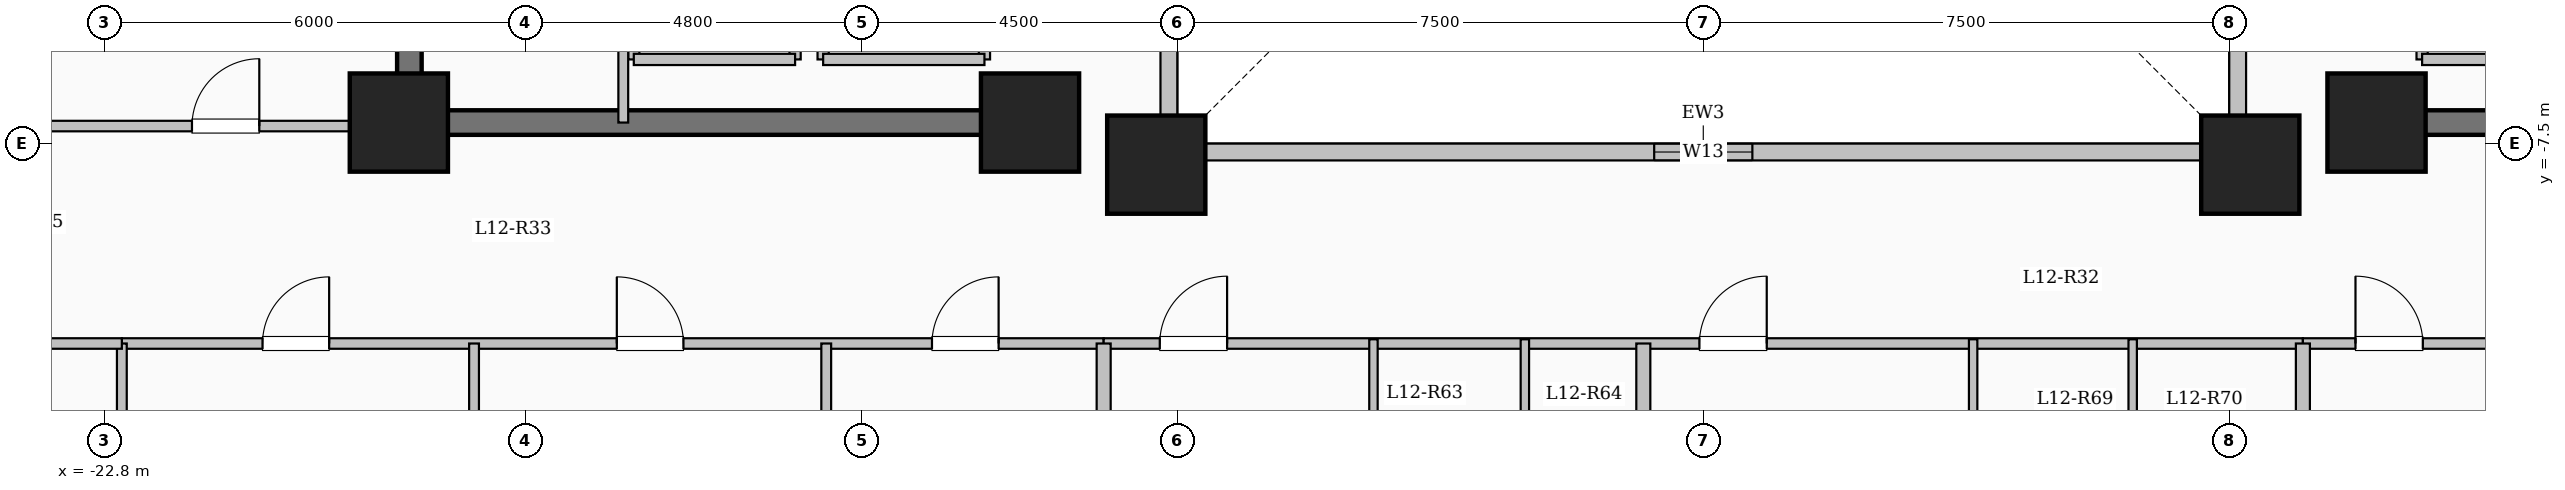
"""IFC4 building model, lengths in metres.
Left out: names, types, materials, properties, quantities, classifications, styles, units other than length and angle.
Written with IfcOpenShell. Run it as: python <this file> out.ifc"""

import sys

from ifc_helpers import new_model, si_unit, direction, frame, frame_2d, origin, origin_2d, place, context, subcontext, project, spatial, rectangle, extrude, element, fill, save


model = new_model("IFC4")
c1 = context("Model", 3, precision=1e-05, world=origin(), true_north=direction((0.0, 1.0)))
c2 = subcontext(c1, "Body", "Model", "MODEL_VIEW")
j1 = project(units=[si_unit("LENGTHUNIT", "METRE"), si_unit("PLANEANGLEUNIT", "RADIAN")], contexts=[c1])
p1 = place(None, origin())
s1 = spatial("IfcSite", under=j1, at=p1, CompositionType="ELEMENT")
p2 = place(p1, origin())
s2 = spatial("IfcBuilding", under=s1, at=p2, CompositionType="ELEMENT")
p3 = place(p2, frame((0.0, 0.0, 47.45)))
s3 = spatial("IfcBuildingStorey", under=s2, at=p3, CompositionType="ELEMENT", Elevation=47.45)
for number, where, z_axis, x_axis in (
    (1, (-7.8, -7.8, 0.0), (0.0, 0.0, 1.0), (1.0, 0.0, 0.0)),
    (2, (7.8, -7.8, 0.0), (0.0, 0.0, 1.0), (1.0, 0.0, 0.0)),
    (3, (-9.6, -7.2, 0.0), (0.0, 0.0, 1.0), (1.0, 0.0, 0.0)),
    (4, (9.6, -7.2, 0.0), (0.0, 0.0, 1.0), (1.0, 0.0, 0.0)),
    (5, (-18.6, -7.2, 0.0), (0.0, 0.0, 1.0), (1.0, 0.0, 0.0)),
):
    element("IfcColumn", number, at=place(p3, frame(where, z_axis=z_axis, x_axis=x_axis)), inside=s3, PredefinedType="COLUMN", context=c2, shape_type="SweptSolid", body=[
        extrude(rectangle(XDim=1.4, YDim=1.4, at=origin_2d()), origin(), (0.0, 0.0, 1.0), 3.35),
    ])
p4 = place(p3, frame((-7.62, -7.62, 0.0), z_axis=(0.0, 0.0, 1.0), x_axis=(1.0, 0.0, 0.0)))
e6 = element("IfcWall", 6, at=p4, inside=s3, PredefinedType="SOLIDWALL", context=c2, shape_type="SweptSolid", body=[
    extrude(rectangle(XDim=15.24, YDim=0.24, at=frame_2d((7.62, 0.0))), origin(), (0.0, 0.0, 1.0), 3.1),
])
p5 = place(p4, frame((6.92, 0.0, 0.95)))
e7 = element("IfcOpeningElement", 7, at=p5, cuts=e6, PredefinedType="OPENING", context=c2, shape_type="SweptSolid", body=[
    extrude(rectangle(XDim=1.4, YDim=1.5, at=frame_2d((0.7, 0.75))), frame((0.0, 0.13, 0.0), z_axis=(0.0, -1.0, 0.0), x_axis=(1.0, 0.0, 0.0)), (0.0, 0.0, 1.0), 0.26),
])
p6 = place(p3, frame((7.62, -7.62, 0.0), z_axis=(0.0, 0.0, 1.0), x_axis=(0.0, 1.0, 0.0)))
e8 = element("IfcWall", 8, at=p6, inside=s3, PredefinedType="SOLIDWALL", context=c2, shape_type="SweptSolid", body=[
    extrude(rectangle(XDim=15.24, YDim=0.24, at=frame_2d((7.62, 0.0))), origin(), (0.0, 0.0, 1.0), 3.1),
])
p7 = place(p6, frame((6.92, 0.0, 0.95)))
e9 = element("IfcOpeningElement", 9, at=p7, cuts=e8, PredefinedType="OPENING", context=c2, shape_type="SweptSolid", body=[
    extrude(rectangle(XDim=1.4, YDim=1.5, at=frame_2d((0.7, 0.75))), frame((0.0, 0.13, 0.0), z_axis=(0.0, -1.0, 0.0), x_axis=(1.0, 0.0, 0.0)), (0.0, 0.0, 1.0), 0.26),
])
p8 = place(p3, frame((-7.62, 7.62, 0.0), z_axis=(0.0, 0.0, 1.0), x_axis=(0.0, -1.0, 0.0)))
e10 = element("IfcWall", 10, at=p8, inside=s3, PredefinedType="SOLIDWALL", context=c2, shape_type="SweptSolid", body=[
    extrude(rectangle(XDim=15.24, YDim=0.24, at=frame_2d((7.62, 0.0))), origin(), (0.0, 0.0, 1.0), 3.1),
])
p9 = place(p8, frame((6.92, 0.0, 0.95)))
e11 = element("IfcOpeningElement", 11, at=p9, cuts=e10, PredefinedType="OPENING", context=c2, shape_type="SweptSolid", body=[
    extrude(rectangle(XDim=1.4, YDim=1.5, at=frame_2d((0.7, 0.75))), frame((0.0, 0.13, 0.0), z_axis=(0.0, -1.0, 0.0), x_axis=(1.0, 0.0, 0.0)), (0.0, 0.0, 1.0), 0.26),
])
p10 = place(p3, frame((-12.55, -6.3, 0.0), z_axis=(0.0, 0.0, 1.0), x_axis=(0.0, 1.0, 0.0)))
e12 = element("IfcWall", 12, at=p10, inside=s3, PredefinedType="SOLIDWALL", context=c2, shape_type="SweptSolid", body=[
    extrude(rectangle(XDim=2.6, YDim=0.16, at=frame_2d((1.3, 0.0))), origin(), (0.0, 0.0, 1.0), 3.1),
])
p11 = place(p3, frame((-10.25, -6.3, 0.0), z_axis=(0.0, 0.0, 1.0), x_axis=(0.0, 1.0, 0.0)))
e13 = element("IfcWall", 13, at=p11, inside=s3, PredefinedType="SOLIDWALL", context=c2, shape_type="SweptSolid", body=[
    extrude(rectangle(XDim=2.6, YDim=0.16, at=frame_2d((1.3, 0.0))), origin(), (0.0, 0.0, 1.0), 3.1),
])
p12 = place(p11, frame((0.75, 0.0, 0.0)))
e14 = element("IfcOpeningElement", 14, at=p12, cuts=e13, PredefinedType="OPENING", context=c2, shape_type="SweptSolid", body=[
    extrude(rectangle(XDim=1.1, YDim=2.15, at=frame_2d((0.55, 1.075))), frame((0.0, 0.09, 0.0), z_axis=(0.0, -1.0, 0.0), x_axis=(1.0, 0.0, 0.0)), (0.0, 0.0, 1.0), 0.18),
])
p13 = place(p3, frame((-12.55, -6.3, 0.0), z_axis=(0.0, 0.0, 1.0), x_axis=(1.0, 0.0, 0.0)))
e15 = element("IfcWall", 15, at=p13, inside=s3, PredefinedType="SOLIDWALL", context=c2, shape_type="SweptSolid", body=[
    extrude(rectangle(XDim=2.3, YDim=0.16, at=frame_2d((1.15, 0.0))), origin(), (0.0, 0.0, 1.0), 3.1),
])
for number, where, z_axis, x_axis in (
    (16, (-15.25, -6.3, 0.0), (0.0, 0.0, 1.0), (0.0, 1.0, 0.0)),
    (17, (-12.95, -6.3, 0.0), (0.0, 0.0, 1.0), (0.0, 1.0, 0.0)),
):
    element("IfcWall", number, at=place(p3, frame(where, z_axis=z_axis, x_axis=x_axis)), inside=s3, PredefinedType="SOLIDWALL", context=c2, shape_type="SweptSolid", body=[
        extrude(rectangle(XDim=2.6, YDim=0.16, at=frame_2d((1.3, 0.0))), origin(), (0.0, 0.0, 1.0), 3.1),
    ])
p14 = place(p3, frame((-15.25, -6.3, 0.0), z_axis=(0.0, 0.0, 1.0), x_axis=(1.0, 0.0, 0.0)))
e18 = element("IfcWall", 18, at=p14, inside=s3, PredefinedType="SOLIDWALL", context=c2, shape_type="SweptSolid", body=[
    extrude(rectangle(XDim=2.3, YDim=0.16, at=frame_2d((1.15, 0.0))), origin(), (0.0, 0.0, 1.0), 3.1),
])
p15 = place(p3, frame((10.25, -6.3, 0.0), z_axis=(0.0, 0.0, 1.0), x_axis=(0.0, 1.0, 0.0)))
e19 = element("IfcWall", 19, at=p15, inside=s3, PredefinedType="SOLIDWALL", context=c2, shape_type="SweptSolid", body=[
    extrude(rectangle(XDim=2.6, YDim=0.16, at=frame_2d((1.3, 0.0))), origin(), (0.0, 0.0, 1.0), 3.1),
])
p16 = place(p3, frame((10.25, -6.3, 0.0), z_axis=(0.0, 0.0, 1.0), x_axis=(1.0, 0.0, 0.0)))
e20 = element("IfcWall", 20, at=p16, inside=s3, PredefinedType="SOLIDWALL", context=c2, shape_type="SweptSolid", body=[
    extrude(rectangle(XDim=2.3, YDim=0.16, at=frame_2d((1.15, 0.0))), origin(), (0.0, 0.0, 1.0), 3.1),
])
p17 = place(p3, frame((-18.45, -7.375, 0.0), z_axis=(0.0, 0.0, 1.0), x_axis=(0.0, 1.0, 0.0)))
e21 = element("IfcWall", 21, at=p17, inside=s3, PredefinedType="SHEAR", context=c2, shape_type="SweptSolid", body=[
    extrude(rectangle(XDim=14.05, YDim=0.35, at=frame_2d((7.025, 0.0))), origin(), (0.0, 0.0, 1.0), 3.35),
])
for number, where, z_axis, x_axis in (
    (22, (-18.625, -7.2, 0.0), (0.0, 0.0, 1.0), (1.0, 0.0, 0.0)),
    (23, (10.075, -7.2, 0.0), (0.0, 0.0, 1.0), (1.0, 0.0, 0.0)),
):
    element("IfcWall", number, at=place(p3, frame(where, z_axis=z_axis, x_axis=x_axis)), inside=s3, PredefinedType="SHEAR", context=c2, shape_type="SweptSolid", body=[
        extrude(rectangle(XDim=8.55, YDim=0.35, at=frame_2d((4.275, 0.0))), origin(), (0.0, 0.0, 1.0), 3.35),
    ])
p18 = place(p3, frame((-15.4, -7.2, 0.0), z_axis=(0.0, 0.0, 1.0), x_axis=(0.0, 1.0, 0.0)))
e24 = element("IfcWall", 24, at=p18, inside=s3, PredefinedType="PARTITIONING", context=c2, shape_type="SweptSolid", body=[
    extrude(rectangle(XDim=10.45, YDim=0.14, at=frame_2d((5.225, 0.0))), origin(), (0.0, 0.0, 1.0), 3.1),
])
p19 = place(p18, frame((9.25, 0.0, 0.0)))
e25 = element("IfcOpeningElement", 25, at=p19, cuts=e24, PredefinedType="OPENING", context=c2, shape_type="SweptSolid", body=[
    extrude(rectangle(XDim=0.9, YDim=2.08, at=frame_2d((0.45, 1.04))), frame((0.0, 0.08, 0.0), z_axis=(0.0, -1.0, 0.0), x_axis=(1.0, 0.0, 0.0)), (0.0, 0.0, 1.0), 0.16),
])
p20 = place(p3, frame((-22.55, -10.35, 0.0), z_axis=(0.0, 0.0, 1.0), x_axis=(1.0, 0.0, 0.0)))
e26 = element("IfcWall", 26, at=p20, inside=s3, PredefinedType="PARTITIONING", context=c2, shape_type="SweptSolid", body=[
    extrude(rectangle(XDim=14.0, YDim=0.15, at=frame_2d((7.0, 0.0))), origin(), (0.0, 0.0, 1.0), 3.1),
])
p21 = place(p20, frame((2.006, 0.0, 0.0)))
e27 = element("IfcOpeningElement", 27, at=p21, cuts=e26, PredefinedType="OPENING", context=c2, shape_type="SweptSolid", body=[
    extrude(rectangle(XDim=0.95, YDim=2.15, at=frame_2d((0.475, 1.075))), frame((0.0, 0.085, 0.0), z_axis=(0.0, -1.0, 0.0), x_axis=(1.0, 0.0, 0.0)), (0.0, 0.0, 1.0), 0.17),
])
p22 = place(p20, frame((7.058, 0.0, 0.0)))
e28 = element("IfcOpeningElement", 28, at=p22, cuts=e26, PredefinedType="OPENING", context=c2, shape_type="SweptSolid", body=[
    extrude(rectangle(XDim=0.95, YDim=2.15, at=frame_2d((0.475, 1.075))), frame((0.0, 0.085, 0.0), z_axis=(0.0, -1.0, 0.0), x_axis=(1.0, 0.0, 0.0)), (0.0, 0.0, 1.0), 0.17),
])
p23 = place(p20, frame((11.552, 0.0, 0.0)))
e29 = element("IfcOpeningElement", 29, at=p23, cuts=e26, PredefinedType="OPENING", context=c2, shape_type="SweptSolid", body=[
    extrude(rectangle(XDim=0.95, YDim=2.15, at=frame_2d((0.475, 1.075))), frame((0.0, 0.085, 0.0), z_axis=(0.0, -1.0, 0.0), x_axis=(1.0, 0.0, 0.0)), (0.0, 0.0, 1.0), 0.17),
])
p24 = place(p3, frame((-8.55, -10.35, 0.0), z_axis=(0.0, 0.0, 1.0), x_axis=(1.0, 0.0, 0.0)))
e30 = element("IfcWall", 30, at=p24, inside=s3, PredefinedType="PARTITIONING", context=c2, shape_type="SweptSolid", body=[
    extrude(rectangle(XDim=17.1, YDim=0.15, at=frame_2d((8.55, 0.0))), origin(), (0.0, 0.0, 1.0), 3.1),
])
p25 = place(p24, frame((0.8, 0.0, 0.0)))
e31 = element("IfcOpeningElement", 31, at=p25, cuts=e30, PredefinedType="OPENING", context=c2, shape_type="SweptSolid", body=[
    extrude(rectangle(XDim=0.96, YDim=2.15, at=frame_2d((0.48, 1.075))), frame((0.0, 0.085, 0.0), z_axis=(0.0, -1.0, 0.0), x_axis=(1.0, 0.0, 0.0)), (0.0, 0.0, 1.0), 0.17),
])
p26 = place(p24, frame((8.495, 0.0, 0.0)))
e32 = element("IfcOpeningElement", 32, at=p26, cuts=e30, PredefinedType="OPENING", context=c2, shape_type="SweptSolid", body=[
    extrude(rectangle(XDim=0.96, YDim=2.15, at=frame_2d((0.48, 1.075))), frame((0.0, 0.085, 0.0), z_axis=(0.0, -1.0, 0.0), x_axis=(1.0, 0.0, 0.0)), (0.0, 0.0, 1.0), 0.17),
])
p27 = place(p3, frame((8.55, -10.35, 0.0), z_axis=(0.0, 0.0, 1.0), x_axis=(1.0, 0.0, 0.0)))
e33 = element("IfcWall", 33, at=p27, inside=s3, PredefinedType="PARTITIONING", context=c2, shape_type="SweptSolid", body=[
    extrude(rectangle(XDim=14.0, YDim=0.15, at=frame_2d((7.0, 0.0))), origin(), (0.0, 0.0, 1.0), 3.1),
])
p28 = place(p27, frame((0.75, 0.0, 0.0)))
e34 = element("IfcOpeningElement", 34, at=p28, cuts=e33, PredefinedType="OPENING", context=c2, shape_type="SweptSolid", body=[
    extrude(rectangle(XDim=0.96, YDim=2.15, at=frame_2d((0.48, 1.075))), frame((0.0, 0.085, 0.0), z_axis=(0.0, -1.0, 0.0), x_axis=(1.0, 0.0, 0.0)), (0.0, 0.0, 1.0), 0.17),
])
p29 = place(p27, frame((7.446, 0.0, 0.0)))
e35 = element("IfcOpeningElement", 35, at=p29, cuts=e33, PredefinedType="OPENING", context=c2, shape_type="SweptSolid", body=[
    extrude(rectangle(XDim=0.96, YDim=2.15, at=frame_2d((0.48, 1.075))), frame((0.0, 0.085, 0.0), z_axis=(0.0, -1.0, 0.0), x_axis=(1.0, 0.0, 0.0)), (0.0, 0.0, 1.0), 0.17),
])
for number, where, z_axis, x_axis in (
    (36, (-17.528, -23.55, 0.0), (0.0, 0.0, 1.0), (0.0, 1.0, 0.0)),
    (37, (-12.506, -23.55, 0.0), (0.0, 0.0, 1.0), (0.0, 1.0, 0.0)),
):
    element("IfcWall", number, at=place(p3, frame(where, z_axis=z_axis, x_axis=x_axis)), inside=s3, PredefinedType="PARTITIONING", context=c2, shape_type="SweptSolid", body=[
        extrude(rectangle(XDim=13.2, YDim=0.14, at=frame_2d((6.6, 0.0))), origin(), (0.0, 0.0, 1.0), 3.1),
    ])
for number, where, z_axis, x_axis in (
    (38, (-8.55, -24.204, 0.0), (0.0, 0.0, 1.0), (0.0, 1.0, 0.0)),
    (39, (8.55, -24.204, 0.0), (0.0, 0.0, 1.0), (0.0, 1.0, 0.0)),
):
    element("IfcWall", number, at=place(p3, frame(where, z_axis=z_axis, x_axis=x_axis)), inside=s3, PredefinedType="SOLIDWALL", context=c2, shape_type="SweptSolid", body=[
        extrude(rectangle(XDim=13.854, YDim=0.2, at=frame_2d((6.927, 0.0))), origin(), (0.0, 0.0, 1.0), 3.1),
    ])
p30 = place(p3, frame((-0.855, -25.08, 0.0), z_axis=(0.0, 0.0, 1.0), x_axis=(0.0, 1.0, 0.0)))
e40 = element("IfcWall", 40, at=p30, inside=s3, PredefinedType="SOLIDWALL", context=c2, shape_type="SweptSolid", body=[
    extrude(rectangle(XDim=14.73, YDim=0.2, at=frame_2d((7.365, 0.0))), origin(), (0.0, 0.0, 1.0), 3.1),
])
p31 = place(p3, frame((-4.703, -25.08, 0.0), z_axis=(0.0, 0.0, 1.0), x_axis=(0.0, 1.0, 0.0)))
e41 = element("IfcWall", 41, at=p31, inside=s3, PredefinedType="PARTITIONING", context=c2, shape_type="SweptSolid", body=[
    extrude(rectangle(XDim=14.79, YDim=0.12, at=frame_2d((7.395, 0.0))), origin(), (0.0, 0.0, 1.0), 3.1),
])
p32 = place(p31, frame((10.795, 0.0, 0.0)))
e42 = element("IfcOpeningElement", 42, at=p32, cuts=e41, PredefinedType="OPENING", context=c2, shape_type="SweptSolid", body=[
    extrude(rectangle(XDim=1.08, YDim=2.15, at=frame_2d((0.54, 1.075))), frame((0.0, 0.07, 0.0), z_axis=(0.0, -1.0, 0.0), x_axis=(1.0, 0.0, 0.0)), (0.0, 0.0, 1.0), 0.14),
])
p33 = place(p3, frame((-2.544, -12.92, 0.0), z_axis=(0.0, 0.0, 1.0), x_axis=(0.0, 1.0, 0.0)))
e43 = element("IfcWall", 43, at=p33, inside=s3, PredefinedType="PARTITIONING", context=c2, shape_type="SweptSolid", body=[
    extrude(rectangle(XDim=2.63, YDim=0.12, at=frame_2d((1.315, 0.0))), origin(), (0.0, 0.0, 1.0), 3.1),
])
p34 = place(p3, frame((3.848, -25.08, 0.0), z_axis=(0.0, 0.0, 1.0), x_axis=(0.0, 1.0, 0.0)))
e44 = element("IfcWall", 44, at=p34, inside=s3, PredefinedType="PARTITIONING", context=c2, shape_type="SweptSolid", body=[
    extrude(rectangle(XDim=14.79, YDim=0.12, at=frame_2d((7.395, 0.0))), origin(), (0.0, 0.0, 1.0), 3.1),
])
p35 = place(p34, frame((10.625, 0.0, 0.0)))
e45 = element("IfcOpeningElement", 45, at=p35, cuts=e44, PredefinedType="OPENING", context=c2, shape_type="SweptSolid", body=[
    extrude(rectangle(XDim=1.08, YDim=2.15, at=frame_2d((0.54, 1.075))), frame((0.0, 0.07, 0.0), z_axis=(0.0, -1.0, 0.0), x_axis=(1.0, 0.0, 0.0)), (0.0, 0.0, 1.0), 0.14),
])
p36 = place(p3, frame((6.123, -13.09, 0.0), z_axis=(0.0, 0.0, 1.0), x_axis=(0.0, 1.0, 0.0)))
e46 = element("IfcWall", 46, at=p36, inside=s3, PredefinedType="PARTITIONING", context=c2, shape_type="SweptSolid", body=[
    extrude(rectangle(XDim=2.8, YDim=0.12, at=frame_2d((1.4, 0.0))), origin(), (0.0, 0.0, 1.0), 3.1),
])
p37 = place(p3, frame((-28.68, -7.25, 0.0), z_axis=(0.0, 0.0, 1.0), x_axis=(1.0, 0.0, 0.0)))
e47 = element("IfcWall", 47, at=p37, inside=s3, PredefinedType="PARTITIONING", context=c2, shape_type="SweptSolid", body=[
    extrude(rectangle(XDim=10.23, YDim=0.15, at=frame_2d((5.115, 0.0))), origin(), (0.0, 0.0, 1.0), 3.1),
])
p38 = place(p37, frame((7.13, 0.0, 0.0)))
e48 = element("IfcOpeningElement", 48, at=p38, cuts=e47, PredefinedType="OPENING", context=c2, shape_type="SweptSolid", body=[
    extrude(rectangle(XDim=0.96, YDim=2.15, at=frame_2d((0.48, 1.075))), frame((0.0, 0.085, 0.0), z_axis=(0.0, -1.0, 0.0), x_axis=(1.0, 0.0, 0.0)), (0.0, 0.0, 1.0), 0.17),
])
p39 = place(p3, frame((-22.55, -19.05, 0.0), z_axis=(0.0, 0.0, 1.0), x_axis=(0.0, 1.0, 0.0)))
e49 = element("IfcWall", 49, at=p39, inside=s3, PredefinedType="PARTITIONING", context=c2, shape_type="SweptSolid", body=[
    extrude(rectangle(XDim=8.7, YDim=0.14, at=frame_2d((4.35, 0.0))), origin(), (0.0, 0.0, 1.0), 3.1),
])
p40 = place(p3, frame((-28.68, -10.35, 0.0), z_axis=(0.0, 0.0, 1.0), x_axis=(1.0, 0.0, 0.0)))
e50 = element("IfcWall", 50, at=p40, inside=s3, PredefinedType="PARTITIONING", context=c2, shape_type="SweptSolid", body=[
    extrude(rectangle(XDim=6.13, YDim=0.15, at=frame_2d((3.065, 0.0))), origin(), (0.0, 0.0, 1.0), 3.1),
])
p41 = place(p40, frame((2.59, 0.0, 0.0)))
e51 = element("IfcOpeningElement", 51, at=p41, cuts=e50, PredefinedType="OPENING", context=c2, shape_type="SweptSolid", body=[
    extrude(rectangle(XDim=0.95, YDim=2.15, at=frame_2d((0.475, 1.075))), frame((0.0, 0.085, 0.0), z_axis=(0.0, -1.0, 0.0), x_axis=(1.0, 0.0, 0.0)), (0.0, 0.0, 1.0), 0.17),
])
p42 = place(p5, origin())
e52 = element("IfcWindow", 52, at=p42, inside=s3, PartitioningType="SINGLE_PANEL", PredefinedType="WINDOW", context=c2, shape_type="SweptSolid", body=[
    extrude(rectangle(XDim=1.4, YDim=1.5, at=frame_2d((0.7, 0.75))), frame((0.0, 0.03, 0.0), z_axis=(0.0, -1.0, 0.0), x_axis=(1.0, 0.0, 0.0)), (0.0, 0.0, 1.0), 0.06),
])
fill(e7, e52)
p43 = place(p21, origin())
e53 = element("IfcDoor", 53, at=p43, inside=s3, OperationType="SINGLE_SWING_RIGHT", PredefinedType="DOOR", context=c2, shape_type="SweptSolid", body=[
    extrude(rectangle(XDim=0.95, YDim=2.15, at=frame_2d((0.475, 1.075))), frame((0.0, 0.025, 0.0), z_axis=(0.0, -1.0, 0.0), x_axis=(1.0, 0.0, 0.0)), (0.0, 0.0, 1.0), 0.05),
])
fill(e27, e53)
p44 = place(p22, origin())
e54 = element("IfcDoor", 54, at=p44, inside=s3, OperationType="SINGLE_SWING_LEFT", PredefinedType="DOOR", context=c2, shape_type="SweptSolid", body=[
    extrude(rectangle(XDim=0.95, YDim=2.15, at=frame_2d((0.475, 1.075))), frame((0.0, 0.025, 0.0), z_axis=(0.0, -1.0, 0.0), x_axis=(1.0, 0.0, 0.0)), (0.0, 0.0, 1.0), 0.05),
])
fill(e28, e54)
p45 = place(p23, origin())
e55 = element("IfcDoor", 55, at=p45, inside=s3, OperationType="SINGLE_SWING_RIGHT", PredefinedType="DOOR", context=c2, shape_type="SweptSolid", body=[
    extrude(rectangle(XDim=0.95, YDim=2.15, at=frame_2d((0.475, 1.075))), frame((0.0, 0.025, 0.0), z_axis=(0.0, -1.0, 0.0), x_axis=(1.0, 0.0, 0.0)), (0.0, 0.0, 1.0), 0.05),
])
fill(e29, e55)
p46 = place(p28, origin())
e56 = element("IfcDoor", 56, at=p46, inside=s3, OperationType="SINGLE_SWING_LEFT", PredefinedType="DOOR", context=c2, shape_type="SweptSolid", body=[
    extrude(rectangle(XDim=0.96, YDim=2.15, at=frame_2d((0.48, 1.075))), frame((0.0, 0.025, 0.0), z_axis=(0.0, -1.0, 0.0), x_axis=(1.0, 0.0, 0.0)), (0.0, 0.0, 1.0), 0.05),
])
fill(e34, e56)
p47 = place(p25, origin())
e57 = element("IfcDoor", 57, at=p47, inside=s3, OperationType="SINGLE_SWING_RIGHT", PredefinedType="DOOR", context=c2, shape_type="SweptSolid", body=[
    extrude(rectangle(XDim=0.96, YDim=2.15, at=frame_2d((0.48, 1.075))), frame((0.0, 0.025, 0.0), z_axis=(0.0, -1.0, 0.0), x_axis=(1.0, 0.0, 0.0)), (0.0, 0.0, 1.0), 0.05),
])
fill(e31, e57)
p48 = place(p26, origin())
e58 = element("IfcDoor", 58, at=p48, inside=s3, OperationType="SINGLE_SWING_RIGHT", PredefinedType="DOOR", context=c2, shape_type="SweptSolid", body=[
    extrude(rectangle(XDim=0.96, YDim=2.15, at=frame_2d((0.48, 1.075))), frame((0.0, 0.025, 0.0), z_axis=(0.0, -1.0, 0.0), x_axis=(1.0, 0.0, 0.0)), (0.0, 0.0, 1.0), 0.05),
])
fill(e32, e58)
p49 = place(p38, origin())
e59 = element("IfcDoor", 59, at=p49, inside=s3, OperationType="SINGLE_SWING_RIGHT", PredefinedType="DOOR", context=c2, shape_type="SweptSolid", body=[
    extrude(rectangle(XDim=0.96, YDim=2.15, at=frame_2d((0.48, 1.075))), frame((0.0, 0.025, 0.0), z_axis=(0.0, -1.0, 0.0), x_axis=(1.0, 0.0, 0.0)), (0.0, 0.0, 1.0), 0.05),
])
fill(e48, e59)
save(model, sys.argv[1])
